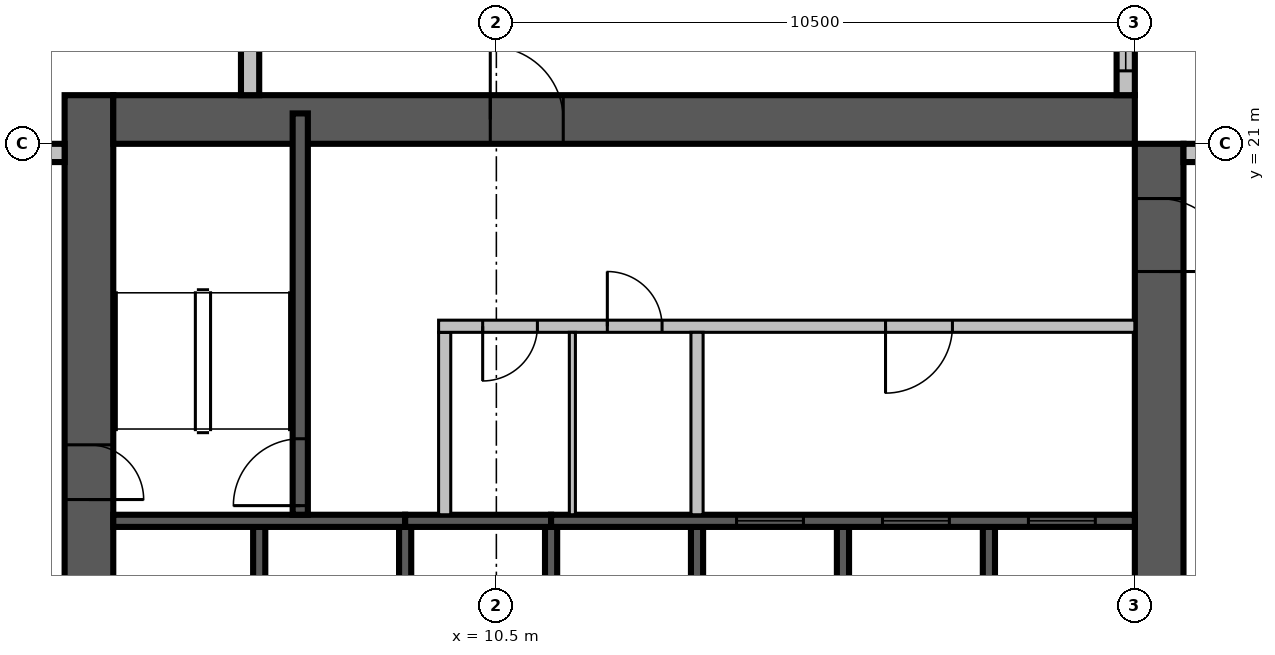
"""IFC4 building model, lengths in metres.
Left out: names, types, materials, properties, quantities, classifications, styles, units other than length and angle.
Written with IfcOpenShell. Run it as: python <this file> out.ifc"""

import sys

from ifc_helpers import new_model, si_unit, direction, frame, frame_2d, origin, place, context, subcontext, project, spatial, rectangle, extrude, source, transform, mapped, element, fill, save


model = new_model("IFC4")
c1 = context("Model", 3, precision=1e-05, world=origin(), true_north=direction((0.0, 1.0)))
c2 = subcontext(c1, "Body", "Model", "MODEL_VIEW")
j1 = project(units=[si_unit("LENGTHUNIT", "METRE"), si_unit("PLANEANGLEUNIT", "RADIAN")], contexts=[c1])
p1 = place(None, origin())
s1 = spatial("IfcSite", under=j1, at=p1, CompositionType="ELEMENT")
p2 = place(p1, origin())
s2 = spatial("IfcBuilding", under=s1, at=p2, CompositionType="ELEMENT")
p3 = place(p2, frame((0.0, 0.0, 208.2)))
s3 = spatial("IfcBuildingStorey", under=s2, at=p3, CompositionType="ELEMENT", Elevation=208.2)
m1 = source(origin(), c2, "Body", "SweptSolid", [
    extrude(rectangle(XDim=17.6, YDim=0.8, at=frame_2d((8.8, 0.0))), origin(), (0.0, 0.0, 1.0), 3.8),
])
p4 = place(p3, frame((3.8, 4.2, 0.0), z_axis=(0.0, 0.0, 1.0), x_axis=(0.0, 1.0, 0.0)))
e1 = element("IfcWall", 1, at=p4, inside=s3, PredefinedType="SHEAR", context=c2, shape_type="MappedRepresentation", body=[
    mapped(m1, transform((0.0, 0.0, 0.0), scale=1.0)),
])
m2 = source(origin(), c2, "Body", "SweptSolid", [
    extrude(rectangle(XDim=2.2, YDim=2.1, at=frame_2d((1.1, 1.05))), frame((0.0, 0.41, 0.0), z_axis=(0.0, -1.0, 0.0), x_axis=(1.0, 0.0, 0.0)), (0.0, 0.0, 1.0), 0.82),
])
p5 = place(p4, frame((4.2, 0.0, 0.0)))
e2 = element("IfcOpeningElement", 2, at=p5, cuts=e1, PredefinedType="OPENING", context=c2, shape_type="MappedRepresentation", body=[
    mapped(m2, transform((0.0, 0.0, 0.0), scale=1.0)),
])
m3 = source(origin(), c2, "Body", "SweptSolid", [
    extrude(rectangle(XDim=0.9, YDim=2.1, at=frame_2d((0.45, 1.05))), frame((0.0, 0.41, 0.0), z_axis=(0.0, -1.0, 0.0), x_axis=(1.0, 0.0, 0.0)), (0.0, 0.0, 1.0), 0.82),
])
p6 = place(p4, frame((10.95, 0.0, 0.0)))
e3 = element("IfcOpeningElement", 3, at=p6, cuts=e1, PredefinedType="OPENING", context=c2, shape_type="MappedRepresentation", body=[
    mapped(m3, transform((0.0, 0.0, 0.0), scale=1.0)),
])
m4 = source(origin(), c2, "Body", "SweptSolid", [
    extrude(rectangle(XDim=16.8, YDim=0.8, at=frame_2d((8.4, 0.0))), origin(), (0.0, 0.0, 1.0), 3.8),
])
p7 = place(p3, frame((21.4, 4.2, 0.0), z_axis=(0.0, 0.0, 1.0), x_axis=(0.0, 1.0, 0.0)))
e4 = element("IfcWall", 4, at=p7, inside=s3, PredefinedType="SHEAR", context=c2, shape_type="MappedRepresentation", body=[
    mapped(m4, transform((0.0, 0.0, 0.0), scale=1.0)),
])
m5 = source(origin(), c2, "Body", "SweptSolid", [
    extrude(rectangle(XDim=1.2, YDim=2.1, at=frame_2d((0.6, 1.05))), frame((0.0, 0.41, 0.0), z_axis=(0.0, -1.0, 0.0), x_axis=(1.0, 0.0, 0.0)), (0.0, 0.0, 1.0), 0.82),
])
p8 = place(p7, frame((14.7, 0.0, 0.0)))
e5 = element("IfcOpeningElement", 5, at=p8, cuts=e4, PredefinedType="OPENING", context=c2, shape_type="MappedRepresentation", body=[
    mapped(m5, transform((0.0, 0.0, 0.0), scale=1.0)),
])
p9 = place(p3, frame((4.2, 21.4, 0.0), z_axis=(0.0, 0.0, 1.0), x_axis=(1.0, 0.0, 0.0)))
e6 = element("IfcWall", 6, at=p9, inside=s3, PredefinedType="SHEAR", context=c2, shape_type="MappedRepresentation", body=[
    mapped(m4, transform((0.0, 0.0, 0.0), scale=1.0)),
])
p10 = place(p9, frame((6.2, 0.0, 0.0)))
e7 = element("IfcOpeningElement", 7, at=p10, cuts=e6, PredefinedType="OPENING", context=c2, shape_type="MappedRepresentation", body=[
    mapped(m5, transform((0.0, 0.0, 0.0), scale=1.0)),
])
m6 = source(origin(), c2, "Body", "SweptSolid", [
    extrude(rectangle(XDim=7.15, YDim=0.3, at=frame_2d((3.575, 0.0))), origin(), (0.0, 0.0, 1.0), 3.4),
])
p11 = place(p3, frame((28.95, 20.85, 0.0), z_axis=(0.0, 0.0, 1.0), x_axis=(-1.0, 0.0, 0.0)))
e8 = element("IfcWall", 8, at=p11, inside=s3, PredefinedType="STANDARD", context=c2, shape_type="MappedRepresentation", body=[
    mapped(m6, transform((0.0, 0.0, 0.0), scale=1.0)),
])
m7 = source(origin(), c2, "Body", "SweptSolid", [
    extrude(rectangle(XDim=3.0, YDim=2.3, at=frame_2d((1.5, 1.15))), frame((0.0, 0.16, 0.0), z_axis=(0.0, -1.0, 0.0), x_axis=(1.0, 0.0, 0.0)), (0.0, 0.0, 1.0), 0.32),
])
p12 = place(p11, frame((0.15, 0.0, 0.6)))
e9 = element("IfcOpeningElement", 9, at=p12, cuts=e8, PredefinedType="OPENING", context=c2, shape_type="MappedRepresentation", body=[
    mapped(m7, transform((0.0, 0.0, 0.0), scale=1.0)),
])
m8 = source(origin(), c2, "Body", "SweptSolid", [
    extrude(rectangle(XDim=1.8, YDim=2.3, at=frame_2d((0.9, 1.15))), frame((0.0, 0.16, 0.0), z_axis=(0.0, -1.0, 0.0), x_axis=(1.0, 0.0, 0.0)), (0.0, 0.0, 1.0), 0.32),
])
p13 = place(p11, frame((4.95, 0.0, 0.6)))
e10 = element("IfcOpeningElement", 10, at=p13, cuts=e8, PredefinedType="OPENING", context=c2, shape_type="MappedRepresentation", body=[
    mapped(m8, transform((0.0, 0.0, 0.0), scale=1.0)),
])
p14 = place(p3, frame((20.85, 21.8, 0.0), z_axis=(0.0, 0.0, 1.0), x_axis=(0.0, 1.0, 0.0)))
e11 = element("IfcWall", 11, at=p14, inside=s3, PredefinedType="STANDARD", context=c2, shape_type="SweptSolid", body=[
    extrude(rectangle(XDim=7.15, YDim=0.3, at=frame_2d((3.575, 0.0))), origin(), (0.0, 0.0, 1.0), 2.9),
])
p15 = place(p14, frame((0.4, 0.0, 0.6)))
e12 = element("IfcOpeningElement", 12, at=p15, cuts=e11, PredefinedType="OPENING", context=c2, shape_type="MappedRepresentation", body=[
    mapped(m8, transform((0.0, 0.0, 0.0), scale=1.0)),
])
p16 = place(p14, frame((4.0, 0.0, 0.6)))
e13 = element("IfcOpeningElement", 13, at=p16, cuts=e11, PredefinedType="OPENING", context=c2, shape_type="MappedRepresentation", body=[
    mapped(m7, transform((0.0, 0.0, 0.0), scale=1.0)),
])
m9 = source(origin(), c2, "Body", "SweptSolid", [
    extrude(rectangle(XDim=16.6, YDim=0.3, at=frame_2d((8.3, 0.0))), origin(), (0.0, 0.0, 1.0), 3.4),
])
p17 = place(p3, frame((6.45, 38.4, 0.0), z_axis=(0.0, 0.0, 1.0), x_axis=(0.0, -1.0, 0.0)))
e14 = element("IfcWall", 14, at=p17, inside=s3, PredefinedType="STANDARD", context=c2, shape_type="MappedRepresentation", body=[
    mapped(m9, transform((0.0, 0.0, 0.0), scale=1.0)),
])
p18 = place(p17, frame((1.15, 0.0, 0.6)))
e15 = element("IfcOpeningElement", 15, at=p18, cuts=e14, PredefinedType="OPENING", context=c2, shape_type="MappedRepresentation", body=[
    mapped(m8, transform((0.0, 0.0, 0.0), scale=1.0)),
])
p19 = place(p17, frame((9.438, 0.0, 0.6)))
e16 = element("IfcOpeningElement", 16, at=p19, cuts=e14, PredefinedType="OPENING", context=c2, shape_type="MappedRepresentation", body=[
    mapped(m8, transform((0.0, 0.0, 0.0), scale=1.0)),
])
m10 = source(origin(), c2, "Body", "SweptSolid", [
    extrude(rectangle(XDim=1.2, YDim=2.3, at=frame_2d((0.6, 1.15))), frame((0.0, 0.16, 0.0), z_axis=(0.0, -1.0, 0.0), x_axis=(1.0, 0.0, 0.0)), (0.0, 0.0, 1.0), 0.32),
])
p20 = place(p17, frame((14.338, 0.0, 0.6)))
e17 = element("IfcOpeningElement", 17, at=p20, cuts=e14, PredefinedType="OPENING", context=c2, shape_type="MappedRepresentation", body=[
    mapped(m10, transform((0.0, 0.0, 0.0), scale=1.0)),
])
p21 = place(p17, frame((11.887, 0.0, 0.6)))
e18 = element("IfcOpeningElement", 18, at=p21, cuts=e14, PredefinedType="OPENING", context=c2, shape_type="MappedRepresentation", body=[
    mapped(m8, transform((0.0, 0.0, 0.0), scale=1.0)),
])
m11 = source(origin(), c2, "Body", "SweptSolid", [
    extrude(rectangle(XDim=1.0, YDim=2.1, at=frame_2d((0.5, 1.05))), frame((0.0, 0.16, 0.0), z_axis=(0.0, -1.0, 0.0), x_axis=(1.0, 0.0, 0.0)), (0.0, 0.0, 1.0), 0.32),
])
p22 = place(p17, frame((5.45, 0.0, 0.0)))
e19 = element("IfcOpeningElement", 19, at=p22, cuts=e14, PredefinedType="OPENING", context=c2, shape_type="MappedRepresentation", body=[
    mapped(m11, transform((0.0, 0.0, 0.0), scale=1.0)),
])
m12 = source(origin(), c2, "Body", "SweptSolid", [
    extrude(rectangle(XDim=2.5, YDim=0.3, at=frame_2d((1.25, 0.0))), origin(), (0.0, 0.0, 1.0), 3.4),
])
p23 = place(p3, frame((3.4, 20.85, 0.0), z_axis=(0.0, 0.0, 1.0), x_axis=(-1.0, 0.0, 0.0)))
e20 = element("IfcWall", 20, at=p23, inside=s3, PredefinedType="STANDARD", context=c2, shape_type="MappedRepresentation", body=[
    mapped(m12, transform((0.0, 0.0, 0.0), scale=1.0)),
])
p24 = place(p23, frame((0.4, 0.0, 0.6)))
e21 = element("IfcOpeningElement", 21, at=p24, cuts=e20, PredefinedType="OPENING", context=c2, shape_type="MappedRepresentation", body=[
    mapped(m8, transform((0.0, 0.0, 0.0), scale=1.0)),
])
m13 = source(origin(), c2, "Body", "SweptSolid", [
    extrude(rectangle(XDim=3.0, YDim=0.2, at=frame_2d((1.5, 0.0))), origin(), (0.0, 0.0, 1.0), 3.8),
])
p25 = place(p3, frame((6.6, 11.7, 0.0), z_axis=(0.0, 0.0, 1.0), x_axis=(0.0, 1.0, 0.0)))
e22 = element("IfcWall", 22, at=p25, inside=s3, PredefinedType="SOLIDWALL", context=c2, shape_type="MappedRepresentation", body=[
    mapped(m13, transform((0.0, 0.0, 0.0), scale=1.0)),
])
m14 = source(origin(), c2, "Body", "SweptSolid", [
    extrude(rectangle(XDim=3.0, YDim=0.2, at=frame_2d((1.5, 0.0))), origin(), (0.0, 0.0, 1.0), 3.4),
])
for number, where, z_axis, x_axis in (
    (23, (9.0, 11.7, 0.0), (0.0, 0.0, 1.0), (0.0, 1.0, 0.0)),
    (24, (11.4, 11.7, 0.0), (0.0, 0.0, 1.0), (0.0, 1.0, 0.0)),
):
    element("IfcWall", number, at=place(p3, frame(where, z_axis=z_axis, x_axis=x_axis)), inside=s3, PredefinedType="SOLIDWALL", context=c2, shape_type="MappedRepresentation", body=[
        mapped(m14, transform((0.0, 0.0, 0.0), scale=1.0)),
    ])
for number, where, z_axis, x_axis in (
    (25, (13.8, 11.7, 0.0), (0.0, 0.0, 1.0), (0.0, 1.0, 0.0)),
    (26, (16.2, 11.7, 0.0), (0.0, 0.0, 1.0), (0.0, 1.0, 0.0)),
    (27, (18.6, 11.7, 0.0), (0.0, 0.0, 1.0), (0.0, 1.0, 0.0)),
):
    element("IfcWall", number, at=place(p3, frame(where, z_axis=z_axis, x_axis=x_axis)), inside=s3, PredefinedType="SOLIDWALL", context=c2, shape_type="MappedRepresentation", body=[
        mapped(m13, transform((0.0, 0.0, 0.0), scale=1.0)),
    ])
m15 = source(origin(), c2, "Body", "SweptSolid", [
    extrude(rectangle(XDim=4.8, YDim=0.2, at=frame_2d((2.4, 0.0))), origin(), (0.0, 0.0, 1.0), 3.8),
])
p26 = place(p3, frame((4.2, 14.8, 0.0), z_axis=(0.0, 0.0, 1.0), x_axis=(1.0, 0.0, 0.0)))
e28 = element("IfcWall", 28, at=p26, inside=s3, PredefinedType="SOLIDWALL", context=c2, shape_type="MappedRepresentation", body=[
    mapped(m15, transform((0.0, 0.0, 0.0), scale=1.0)),
])
m16 = source(origin(), c2, "Body", "SweptSolid", [
    extrude(rectangle(XDim=2.4, YDim=0.2, at=frame_2d((1.2, 0.0))), origin(), (0.0, 0.0, 1.0), 3.4),
])
p27 = place(p3, frame((9.0, 14.8, 0.0), z_axis=(0.0, 0.0, 1.0), x_axis=(1.0, 0.0, 0.0)))
e29 = element("IfcWall", 29, at=p27, inside=s3, PredefinedType="SOLIDWALL", context=c2, shape_type="MappedRepresentation", body=[
    mapped(m16, transform((0.0, 0.0, 0.0), scale=1.0)),
])
m17 = source(origin(), c2, "Body", "SweptSolid", [
    extrude(rectangle(XDim=9.6, YDim=0.2, at=frame_2d((4.8, 0.0))), origin(), (0.0, 0.0, 1.0), 3.8),
])
p28 = place(p3, frame((11.4, 14.8, 0.0), z_axis=(0.0, 0.0, 1.0), x_axis=(1.0, 0.0, 0.0)))
e30 = element("IfcWall", 30, at=p28, inside=s3, PredefinedType="SOLIDWALL", context=c2, shape_type="MappedRepresentation", body=[
    mapped(m17, transform((0.0, 0.0, 0.0), scale=1.0)),
])
m18 = source(origin(), c2, "Body", "SweptSolid", [
    extrude(rectangle(XDim=1.1, YDim=2.1, at=frame_2d((0.55, 1.05))), frame((0.0, 0.11, 0.0), z_axis=(0.0, -1.0, 0.0), x_axis=(1.0, 0.0, 0.0)), (0.0, 0.0, 1.0), 0.22),
])
p29 = place(p28, frame((3.05, 0.0, 0.0)))
e31 = element("IfcOpeningElement", 31, at=p29, cuts=e30, PredefinedType="OPENING", context=c2, shape_type="MappedRepresentation", body=[
    mapped(m18, transform((0.0, 0.0, 0.0), scale=1.0)),
])
p30 = place(p28, frame((5.45, 0.0, 0.0)))
e32 = element("IfcOpeningElement", 32, at=p30, cuts=e30, PredefinedType="OPENING", context=c2, shape_type="MappedRepresentation", body=[
    mapped(m18, transform((0.0, 0.0, 0.0), scale=1.0)),
])
p31 = place(p28, frame((7.85, 0.0, 0.0)))
e33 = element("IfcOpeningElement", 33, at=p31, cuts=e30, PredefinedType="OPENING", context=c2, shape_type="MappedRepresentation", body=[
    mapped(m18, transform((0.0, 0.0, 0.0), scale=1.0)),
])
m19 = source(origin(), c2, "Body", "SweptSolid", [
    extrude(rectangle(XDim=6.6, YDim=0.25, at=frame_2d((3.3, 0.0))), origin(), (0.0, 0.0, 1.0), 3.4),
])
p32 = place(p3, frame((7.275, 14.9, 0.0), z_axis=(0.0, 0.0, 1.0), x_axis=(0.0, 1.0, 0.0)))
e34 = element("IfcWall", 34, at=p32, inside=s3, PredefinedType="SOLIDWALL", context=c2, shape_type="MappedRepresentation", body=[
    mapped(m19, transform((0.0, 0.0, 0.0), scale=1.0)),
])
m20 = source(origin(), c2, "Body", "SweptSolid", [
    extrude(rectangle(XDim=1.1, YDim=2.1, at=frame_2d((0.55, 1.05))), frame((0.0, 0.135, 0.0), z_axis=(0.0, -1.0, 0.0), x_axis=(1.0, 0.0, 0.0)), (0.0, 0.0, 1.0), 0.27),
])
p33 = place(p32, frame((0.15, 0.0, 0.0)))
e35 = element("IfcOpeningElement", 35, at=p33, cuts=e34, PredefinedType="OPENING", context=c2, shape_type="MappedRepresentation", body=[
    mapped(m20, transform((0.0, 0.0, 0.0), scale=1.0)),
])
m21 = source(origin(), c2, "Body", "SweptSolid", [
    extrude(rectangle(XDim=3.0, YDim=0.2, at=frame_2d((1.5, 0.0))), origin(), (0.0, 0.0, 1.0), 3.4),
])
p34 = place(p3, frame((9.65, 14.9, 0.0), z_axis=(0.0, 0.0, 1.0), x_axis=(0.0, 1.0, 0.0)))
e36 = element("IfcWall", 36, at=p34, inside=s3, PredefinedType="PARTITIONING", context=c2, shape_type="MappedRepresentation", body=[
    mapped(m21, transform((0.0, 0.0, 0.0), scale=1.0)),
])
m22 = source(origin(), c2, "Body", "SweptSolid", [
    extrude(rectangle(XDim=11.45, YDim=0.2, at=frame_2d((5.725, 0.0))), origin(), (0.0, 0.0, 1.0), 3.4),
])
p35 = place(p3, frame((9.55, 18.0, 0.0), z_axis=(0.0, 0.0, 1.0), x_axis=(1.0, 0.0, 0.0)))
e37 = element("IfcWall", 37, at=p35, inside=s3, PredefinedType="PARTITIONING", context=c2, shape_type="MappedRepresentation", body=[
    mapped(m22, transform((0.0, 0.0, 0.0), scale=1.0)),
])
m23 = source(origin(), c2, "Body", "SweptSolid", [
    extrude(rectangle(XDim=0.9, YDim=2.1, at=frame_2d((0.45, 1.05))), frame((0.0, 0.11, 0.0), z_axis=(0.0, -1.0, 0.0), x_axis=(1.0, 0.0, 0.0)), (0.0, 0.0, 1.0), 0.22),
])
p36 = place(p35, frame((0.725, 0.0, 0.0)))
e38 = element("IfcOpeningElement", 38, at=p36, cuts=e37, PredefinedType="OPENING", context=c2, shape_type="MappedRepresentation", body=[
    mapped(m23, transform((0.0, 0.0, 0.0), scale=1.0)),
])
p37 = place(p35, frame((2.775, 0.0, 0.0)))
e39 = element("IfcOpeningElement", 39, at=p37, cuts=e37, PredefinedType="OPENING", context=c2, shape_type="MappedRepresentation", body=[
    mapped(m23, transform((0.0, 0.0, 0.0), scale=1.0)),
])
p38 = place(p35, frame((7.35, 0.0, 0.0)))
e40 = element("IfcOpeningElement", 40, at=p38, cuts=e37, PredefinedType="OPENING", context=c2, shape_type="MappedRepresentation", body=[
    mapped(m18, transform((0.0, 0.0, 0.0), scale=1.0)),
])
p39 = place(p3, frame((13.8, 14.9, 0.0), z_axis=(0.0, 0.0, 1.0), x_axis=(0.0, 1.0, 0.0)))
e41 = element("IfcWall", 41, at=p39, inside=s3, PredefinedType="PARTITIONING", context=c2, shape_type="MappedRepresentation", body=[
    mapped(m21, transform((0.0, 0.0, 0.0), scale=1.0)),
])
m24 = source(origin(), c2, "Body", "SweptSolid", [
    extrude(rectangle(XDim=3.0, YDim=0.1, at=frame_2d((1.5, 0.0))), origin(), (0.0, 0.0, 1.0), 3.4),
])
p40 = place(p3, frame((11.75, 14.9, 0.0), z_axis=(0.0, 0.0, 1.0), x_axis=(0.0, 1.0, 0.0)))
e42 = element("IfcWall", 42, at=p40, inside=s3, PredefinedType="PARTITIONING", context=c2, shape_type="MappedRepresentation", body=[
    mapped(m24, transform((0.0, 0.0, 0.0), scale=1.0)),
])
m25 = source(origin(), c2, "Body", "SweptSolid", [
    extrude(rectangle(XDim=1.8, YDim=2.3, at=frame_2d((0.9, 1.15))), frame((0.0, 0.03, 0.0), z_axis=(0.0, -1.0, 0.0), x_axis=(1.0, 0.0, 0.0)), (0.0, 0.0, 1.0), 0.06),
])
p41 = place(p15, origin())
e43 = element("IfcWindow", 43, at=p41, inside=s3, PartitioningType="SINGLE_PANEL", PredefinedType="WINDOW", context=c2, shape_type="MappedRepresentation", body=[
    mapped(m25, transform((0.0, 0.0, 0.0), scale=1.0)),
])
fill(e12, e43)
m26 = source(origin(), c2, "Body", "SweptSolid", [
    extrude(rectangle(XDim=1.1, YDim=2.1, at=frame_2d((0.55, 1.05))), frame((0.0, 0.025, 0.0), z_axis=(0.0, -1.0, 0.0), x_axis=(1.0, 0.0, 0.0)), (0.0, 0.0, 1.0), 0.05),
])
p42 = place(p29, origin())
e44 = element("IfcDoor", 44, at=p42, inside=s3, OperationType="SLIDING_TO_LEFT", PredefinedType="DOOR", context=c2, shape_type="MappedRepresentation", body=[
    mapped(m26, transform((0.0, 0.0, 0.0), scale=1.0)),
])
fill(e31, e44)
p43 = place(p30, origin())
e45 = element("IfcDoor", 45, at=p43, inside=s3, OperationType="SLIDING_TO_LEFT", PredefinedType="DOOR", context=c2, shape_type="MappedRepresentation", body=[
    mapped(m26, transform((0.0, 0.0, 0.0), scale=1.0)),
])
fill(e32, e45)
p44 = place(p31, origin())
e46 = element("IfcDoor", 46, at=p44, inside=s3, OperationType="SLIDING_TO_LEFT", PredefinedType="DOOR", context=c2, shape_type="MappedRepresentation", body=[
    mapped(m26, transform((0.0, 0.0, 0.0), scale=1.0)),
])
fill(e33, e46)
p45 = place(p33, origin())
e47 = element("IfcDoor", 47, at=p45, inside=s3, OperationType="SINGLE_SWING_LEFT", PredefinedType="DOOR", context=c2, shape_type="MappedRepresentation", body=[
    mapped(m26, transform((0.0, 0.0, 0.0), scale=1.0)),
])
fill(e35, e47)
m27 = source(origin(), c2, "Body", "SweptSolid", [
    extrude(rectangle(XDim=0.9, YDim=2.1, at=frame_2d((0.45, 1.05))), frame((0.0, 0.025, 0.0), z_axis=(0.0, -1.0, 0.0), x_axis=(1.0, 0.0, 0.0)), (0.0, 0.0, 1.0), 0.05),
])
p46 = place(p36, origin())
e48 = element("IfcDoor", 48, at=p46, inside=s3, OperationType="SINGLE_SWING_RIGHT", PredefinedType="DOOR", context=c2, shape_type="MappedRepresentation", body=[
    mapped(m27, transform((0.0, 0.0, 0.0), scale=1.0)),
])
fill(e38, e48)
p47 = place(p37, origin())
e49 = element("IfcDoor", 49, at=p47, inside=s3, OperationType="SINGLE_SWING_LEFT", PredefinedType="DOOR", context=c2, shape_type="MappedRepresentation", body=[
    mapped(m27, transform((0.0, 0.0, 0.0), scale=1.0)),
])
fill(e39, e49)
p48 = place(p38, origin())
e50 = element("IfcDoor", 50, at=p48, inside=s3, OperationType="SINGLE_SWING_RIGHT", PredefinedType="DOOR", context=c2, shape_type="MappedRepresentation", body=[
    mapped(m26, transform((0.0, 0.0, 0.0), scale=1.0)),
])
fill(e40, e50)
m28 = source(origin(), c2, "Body", "SweptSolid", [
    extrude(rectangle(XDim=1.2, YDim=2.1, at=frame_2d((0.6, 1.05))), frame((0.0, 0.025, 0.0), z_axis=(0.0, -1.0, 0.0), x_axis=(1.0, 0.0, 0.0)), (0.0, 0.0, 1.0), 0.05),
])
p49 = place(p10, origin())
e51 = element("IfcDoor", 51, at=p49, inside=s3, OperationType="SINGLE_SWING_LEFT", PredefinedType="DOOR", context=c2, shape_type="MappedRepresentation", body=[
    mapped(m28, transform((0.0, 0.0, 0.0), scale=1.0)),
])
fill(e7, e51)
p50 = place(p8, origin())
e52 = element("IfcDoor", 52, at=p50, inside=s3, OperationType="SINGLE_SWING_RIGHT", PredefinedType="DOOR", context=c2, shape_type="MappedRepresentation", body=[
    mapped(m28, transform((0.0, 0.0, 0.0), scale=1.0)),
])
fill(e5, e52)
p51 = place(p6, origin())
e53 = element("IfcDoor", 53, at=p51, inside=s3, OperationType="SINGLE_SWING_RIGHT", PredefinedType="DOOR", context=c2, shape_type="MappedRepresentation", body=[
    mapped(m27, transform((0.0, 0.0, 0.0), scale=1.0)),
])
fill(e3, e53)
save(model, sys.argv[1])
